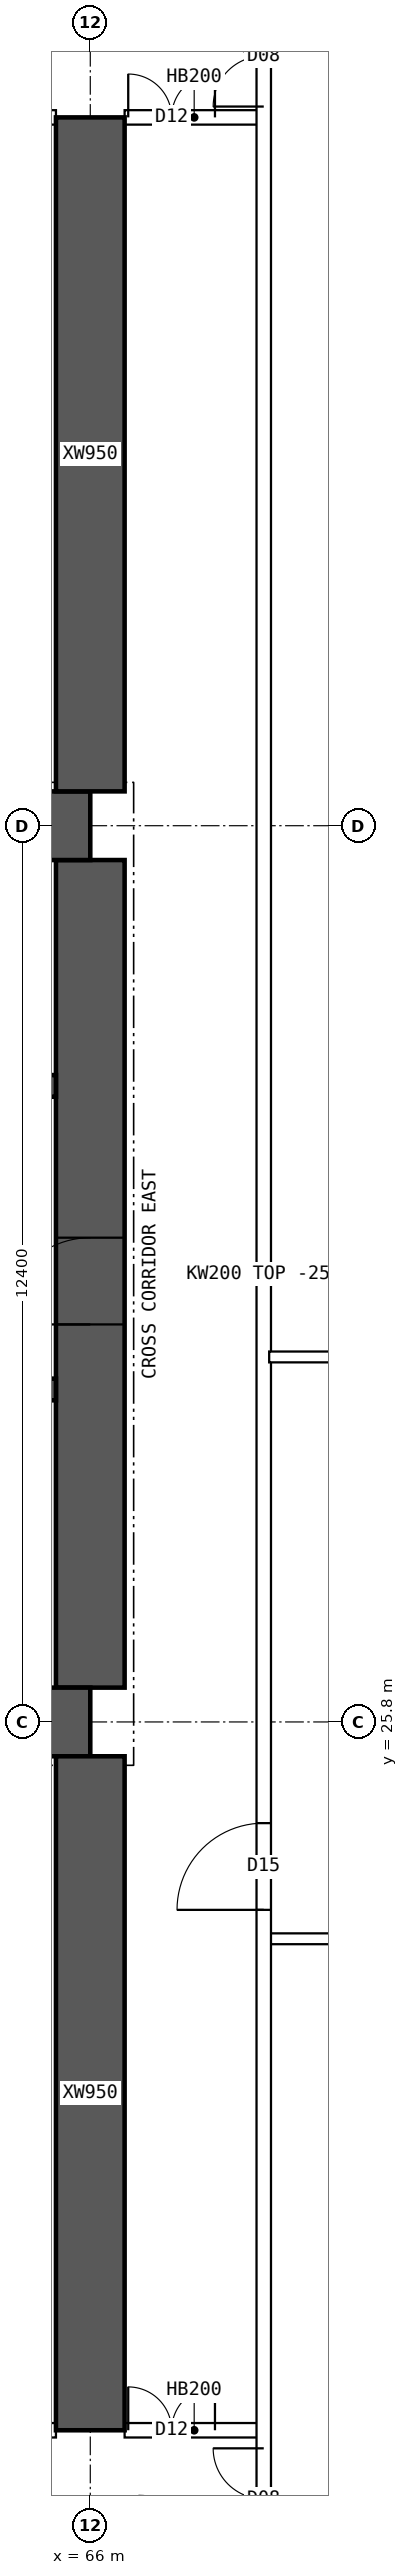
"""IFC4 building model, lengths in metres.
Left out: names, types, materials, properties, quantities, classifications, styles, units other than length and angle.
Written with IfcOpenShell. Run it as: python <this file> out.ifc"""

import sys

from ifc_helpers import new_model, si_unit, direction, frame, frame_2d, origin, place, context, subcontext, project, spatial, polyline, rectangle, outline, extrude, element, fill, save


model = new_model("IFC4")
c1 = context("Model", 3, precision=1e-05, world=origin(), true_north=direction((0.0, 1.0)))
c2 = subcontext(c1, "Body", "Model", "MODEL_VIEW")
j1 = project(units=[si_unit("LENGTHUNIT", "METRE"), si_unit("PLANEANGLEUNIT", "RADIAN")], contexts=[c1])
p1 = place(None, origin())
s1 = spatial("IfcSite", under=j1, at=p1, CompositionType="ELEMENT")
p2 = place(p1, origin())
s2 = spatial("IfcBuilding", under=s1, at=p2, CompositionType="ELEMENT")
p3 = place(p2, frame((0.0, 0.0, 114.4)))
s3 = spatial("IfcBuildingStorey", under=s2, at=p3, CompositionType="ELEMENT", Elevation=114.4)
for number, where, z_axis, x_axis in (
    (1, (18.0, 25.8, 0.0), (0.0, 0.0, 1.0), (1.0, 0.0, 0.0)),
    (2, (18.0, 38.2, 0.0), (0.0, 0.0, 1.0), (1.0, 0.0, 0.0)),
):
    element("IfcWall", number, at=place(p3, frame(where, z_axis=z_axis, x_axis=x_axis)), inside=s3, PredefinedType="SHEAR", context=c2, shape_type="SweptSolid", body=[
        extrude(rectangle(XDim=48.0, YDim=0.95, at=frame_2d((24.0, 0.0))), origin(), (0.0, 0.0, 1.0), 3.75),
    ])
p4 = place(p3, frame((66.0, 26.275, 0.0), z_axis=(0.0, 0.0, 1.0), x_axis=(0.0, 1.0, 0.0)))
e3 = element("IfcWall", 3, at=p4, inside=s3, PredefinedType="SHEAR", context=c2, shape_type="SweptSolid", body=[
    extrude(rectangle(XDim=11.45, YDim=0.95, at=frame_2d((5.725, 0.0))), origin(), (0.0, 0.0, 1.0), 3.75),
])
p5 = place(p4, frame((5.025, 0.0, 0.0)))
e4 = element("IfcOpeningElement", 4, at=p5, cuts=e3, PredefinedType="OPENING", context=c2, shape_type="SweptSolid", body=[
    extrude(rectangle(XDim=1.2, YDim=2.1, at=frame_2d((0.6, 1.05))), frame((0.0, 0.485, 0.0), z_axis=(0.0, -1.0, 0.0), x_axis=(1.0, 0.0, 0.0)), (0.0, 0.0, 1.0), 0.97),
])
p6 = place(p3, frame((18.475, 30.4, 0.0), z_axis=(0.0, 0.0, 1.0), x_axis=(1.0, 0.0, 0.0)))
e5 = element("IfcWall", 5, at=p6, inside=s3, PredefinedType="SHEAR", context=c2, shape_type="SweptSolid", body=[
    extrude(rectangle(XDim=47.05, YDim=0.3, at=frame_2d((23.525, 0.0))), origin(), (0.0, 0.0, 1.0), 3.75),
])
p7 = place(p6, frame((0.4, 0.0, 0.0)))
e6 = element("IfcOpeningElement", 6, at=p7, cuts=e5, PredefinedType="OPENING", context=c2, shape_type="SweptSolid", body=[
    extrude(rectangle(XDim=1.0, YDim=2.1, at=frame_2d((0.5, 1.05))), frame((0.0, 0.16, 0.0), z_axis=(0.0, -1.0, 0.0), x_axis=(1.0, 0.0, 0.0)), (0.0, 0.0, 1.0), 0.32),
])
p8 = place(p6, frame((45.65, 0.0, 0.0)))
e7 = element("IfcOpeningElement", 7, at=p8, cuts=e5, PredefinedType="OPENING", context=c2, shape_type="SweptSolid", body=[
    extrude(rectangle(XDim=1.0, YDim=2.1, at=frame_2d((0.5, 1.05))), frame((0.0, 0.16, 0.0), z_axis=(0.0, -1.0, 0.0), x_axis=(1.0, 0.0, 0.0)), (0.0, 0.0, 1.0), 0.32),
])
p9 = place(p6, frame((8.275, 0.0, 0.0)))
e8 = element("IfcOpeningElement", 8, at=p9, cuts=e5, PredefinedType="OPENING", context=c2, shape_type="SweptSolid", body=[
    extrude(rectangle(XDim=1.1, YDim=2.1, at=frame_2d((0.55, 1.05))), frame((0.0, 0.16, 0.0), z_axis=(0.0, -1.0, 0.0), x_axis=(1.0, 0.0, 0.0)), (0.0, 0.0, 1.0), 0.32),
])
p10 = place(p6, frame((10.875, 0.0, 0.0)))
e9 = element("IfcOpeningElement", 9, at=p10, cuts=e5, PredefinedType="OPENING", context=c2, shape_type="SweptSolid", body=[
    extrude(rectangle(XDim=1.1, YDim=2.1, at=frame_2d((0.55, 1.05))), frame((0.0, 0.16, 0.0), z_axis=(0.0, -1.0, 0.0), x_axis=(1.0, 0.0, 0.0)), (0.0, 0.0, 1.0), 0.32),
])
p11 = place(p6, frame((13.475, 0.0, 0.0)))
e10 = element("IfcOpeningElement", 10, at=p11, cuts=e5, PredefinedType="OPENING", context=c2, shape_type="SweptSolid", body=[
    extrude(rectangle(XDim=1.1, YDim=2.1, at=frame_2d((0.55, 1.05))), frame((0.0, 0.16, 0.0), z_axis=(0.0, -1.0, 0.0), x_axis=(1.0, 0.0, 0.0)), (0.0, 0.0, 1.0), 0.32),
])
p12 = place(p6, frame((16.075, 0.0, 0.0)))
e11 = element("IfcOpeningElement", 11, at=p12, cuts=e5, PredefinedType="OPENING", context=c2, shape_type="SweptSolid", body=[
    extrude(rectangle(XDim=1.1, YDim=2.1, at=frame_2d((0.55, 1.05))), frame((0.0, 0.16, 0.0), z_axis=(0.0, -1.0, 0.0), x_axis=(1.0, 0.0, 0.0)), (0.0, 0.0, 1.0), 0.32),
])
p13 = place(p6, frame((18.85, 0.0, 0.0)))
e12 = element("IfcOpeningElement", 12, at=p13, cuts=e5, PredefinedType="OPENING", context=c2, shape_type="SweptSolid", body=[
    extrude(rectangle(XDim=0.9, YDim=2.1, at=frame_2d((0.45, 1.05))), frame((0.0, 0.16, 0.0), z_axis=(0.0, -1.0, 0.0), x_axis=(1.0, 0.0, 0.0)), (0.0, 0.0, 1.0), 0.32),
])
p14 = place(p6, frame((30.142, 0.0, 0.0)))
e13 = element("IfcOpeningElement", 13, at=p14, cuts=e5, PredefinedType="OPENING", context=c2, shape_type="SweptSolid", body=[
    extrude(rectangle(XDim=1.1, YDim=2.1, at=frame_2d((0.55, 1.05))), frame((0.0, 0.16, 0.0), z_axis=(0.0, -1.0, 0.0), x_axis=(1.0, 0.0, 0.0)), (0.0, 0.0, 1.0), 0.32),
])
p15 = place(p6, frame((33.675, 0.0, 0.0)))
e14 = element("IfcOpeningElement", 14, at=p15, cuts=e5, PredefinedType="OPENING", context=c2, shape_type="SweptSolid", body=[
    extrude(rectangle(XDim=1.1, YDim=2.1, at=frame_2d((0.55, 1.05))), frame((0.0, 0.16, 0.0), z_axis=(0.0, -1.0, 0.0), x_axis=(1.0, 0.0, 0.0)), (0.0, 0.0, 1.0), 0.32),
])
p16 = place(p6, frame((37.208, 0.0, 0.0)))
e15 = element("IfcOpeningElement", 15, at=p16, cuts=e5, PredefinedType="OPENING", context=c2, shape_type="SweptSolid", body=[
    extrude(rectangle(XDim=1.1, YDim=2.1, at=frame_2d((0.55, 1.05))), frame((0.0, 0.16, 0.0), z_axis=(0.0, -1.0, 0.0), x_axis=(1.0, 0.0, 0.0)), (0.0, 0.0, 1.0), 0.32),
])
p17 = place(p3, frame((18.475, 34.6, 0.0), z_axis=(0.0, 0.0, 1.0), x_axis=(1.0, 0.0, 0.0)))
e16 = element("IfcWall", 16, at=p17, inside=s3, PredefinedType="SHEAR", context=c2, shape_type="SweptSolid", body=[
    extrude(rectangle(XDim=47.05, YDim=0.3, at=frame_2d((23.525, 0.0))), origin(), (0.0, 0.0, 1.0), 3.75),
])
p18 = place(p17, frame((0.9, 0.0, 0.0)))
e17 = element("IfcOpeningElement", 17, at=p18, cuts=e16, PredefinedType="OPENING", context=c2, shape_type="SweptSolid", body=[
    extrude(rectangle(XDim=1.1, YDim=2.1, at=frame_2d((0.55, 1.05))), frame((0.0, 0.16, 0.0), z_axis=(0.0, -1.0, 0.0), x_axis=(1.0, 0.0, 0.0)), (0.0, 0.0, 1.0), 0.32),
])
p19 = place(p17, frame((45.05, 0.0, 0.0)))
e18 = element("IfcOpeningElement", 18, at=p19, cuts=e16, PredefinedType="OPENING", context=c2, shape_type="SweptSolid", body=[
    extrude(rectangle(XDim=1.1, YDim=2.1, at=frame_2d((0.55, 1.05))), frame((0.0, 0.16, 0.0), z_axis=(0.0, -1.0, 0.0), x_axis=(1.0, 0.0, 0.0)), (0.0, 0.0, 1.0), 0.32),
])
p20 = place(p17, frame((4.125, 0.0, 0.0)))
e19 = element("IfcOpeningElement", 19, at=p20, cuts=e16, PredefinedType="OPENING", context=c2, shape_type="SweptSolid", body=[
    extrude(rectangle(XDim=0.9, YDim=2.1, at=frame_2d((0.45, 1.05))), frame((0.0, 0.16, 0.0), z_axis=(0.0, -1.0, 0.0), x_axis=(1.0, 0.0, 0.0)), (0.0, 0.0, 1.0), 0.32),
])
p21 = place(p17, frame((42.025, 0.0, 0.0)))
e20 = element("IfcOpeningElement", 20, at=p21, cuts=e16, PredefinedType="OPENING", context=c2, shape_type="SweptSolid", body=[
    extrude(rectangle(XDim=0.9, YDim=2.1, at=frame_2d((0.45, 1.05))), frame((0.0, 0.16, 0.0), z_axis=(0.0, -1.0, 0.0), x_axis=(1.0, 0.0, 0.0)), (0.0, 0.0, 1.0), 0.32),
])
p22 = place(p17, frame((8.9, 0.0, 0.0)))
e21 = element("IfcOpeningElement", 21, at=p22, cuts=e16, PredefinedType="OPENING", context=c2, shape_type="SweptSolid", body=[
    extrude(rectangle(XDim=0.9, YDim=2.1, at=frame_2d((0.45, 1.05))), frame((0.0, 0.16, 0.0), z_axis=(0.0, -1.0, 0.0), x_axis=(1.0, 0.0, 0.0)), (0.0, 0.0, 1.0), 0.32),
])
p23 = place(p17, frame((12.874, 0.0, 0.0)))
e22 = element("IfcOpeningElement", 22, at=p23, cuts=e16, PredefinedType="OPENING", context=c2, shape_type="SweptSolid", body=[
    extrude(rectangle(XDim=0.9, YDim=2.1, at=frame_2d((0.45, 1.05))), frame((0.0, 0.16, 0.0), z_axis=(0.0, -1.0, 0.0), x_axis=(1.0, 0.0, 0.0)), (0.0, 0.0, 1.0), 0.32),
])
p24 = place(p17, frame((16.521, 0.0, 0.0)))
e23 = element("IfcOpeningElement", 23, at=p24, cuts=e16, PredefinedType="OPENING", context=c2, shape_type="SweptSolid", body=[
    extrude(rectangle(XDim=0.9, YDim=2.1, at=frame_2d((0.45, 1.05))), frame((0.0, 0.16, 0.0), z_axis=(0.0, -1.0, 0.0), x_axis=(1.0, 0.0, 0.0)), (0.0, 0.0, 1.0), 0.32),
])
p25 = place(p17, frame((20.28, 0.0, 0.0)))
e24 = element("IfcOpeningElement", 24, at=p25, cuts=e16, PredefinedType="OPENING", context=c2, shape_type="SweptSolid", body=[
    extrude(rectangle(XDim=0.9, YDim=2.1, at=frame_2d((0.45, 1.05))), frame((0.0, 0.16, 0.0), z_axis=(0.0, -1.0, 0.0), x_axis=(1.0, 0.0, 0.0)), (0.0, 0.0, 1.0), 0.32),
])
p26 = place(p17, frame((24.686, 0.0, 0.0)))
e25 = element("IfcOpeningElement", 25, at=p26, cuts=e16, PredefinedType="OPENING", context=c2, shape_type="SweptSolid", body=[
    extrude(rectangle(XDim=0.9, YDim=2.1, at=frame_2d((0.45, 1.05))), frame((0.0, 0.16, 0.0), z_axis=(0.0, -1.0, 0.0), x_axis=(1.0, 0.0, 0.0)), (0.0, 0.0, 1.0), 0.32),
])
p27 = place(p17, frame((27.483, 0.0, 0.0)))
e26 = element("IfcOpeningElement", 26, at=p27, cuts=e16, PredefinedType="OPENING", context=c2, shape_type="SweptSolid", body=[
    extrude(rectangle(XDim=0.9, YDim=2.1, at=frame_2d((0.45, 1.05))), frame((0.0, 0.16, 0.0), z_axis=(0.0, -1.0, 0.0), x_axis=(1.0, 0.0, 0.0)), (0.0, 0.0, 1.0), 0.32),
])
p28 = place(p17, frame((29.856, 0.0, 0.0)))
e27 = element("IfcOpeningElement", 27, at=p28, cuts=e16, PredefinedType="OPENING", context=c2, shape_type="SweptSolid", body=[
    extrude(rectangle(XDim=0.9, YDim=2.1, at=frame_2d((0.45, 1.05))), frame((0.0, 0.16, 0.0), z_axis=(0.0, -1.0, 0.0), x_axis=(1.0, 0.0, 0.0)), (0.0, 0.0, 1.0), 0.32),
])
p29 = place(p17, frame((33.706, 0.0, 0.0)))
e28 = element("IfcOpeningElement", 28, at=p29, cuts=e16, PredefinedType="OPENING", context=c2, shape_type="SweptSolid", body=[
    extrude(rectangle(XDim=0.9, YDim=2.1, at=frame_2d((0.45, 1.05))), frame((0.0, 0.16, 0.0), z_axis=(0.0, -1.0, 0.0), x_axis=(1.0, 0.0, 0.0)), (0.0, 0.0, 1.0), 0.32),
])
p30 = place(p17, frame((37.454, 0.0, 0.0)))
e29 = element("IfcOpeningElement", 29, at=p30, cuts=e16, PredefinedType="OPENING", context=c2, shape_type="SweptSolid", body=[
    extrude(rectangle(XDim=0.9, YDim=2.1, at=frame_2d((0.45, 1.05))), frame((0.0, 0.16, 0.0), z_axis=(0.0, -1.0, 0.0), x_axis=(1.0, 0.0, 0.0)), (0.0, 0.0, 1.0), 0.32),
])
for number, where, z_axis, x_axis in (
    (30, (66.0, 16.0, 0.0), (0.0, 0.0, 1.0), (0.0, 1.0, 0.0)),
    (31, (66.0, 38.675, 0.0), (0.0, 0.0, 1.0), (0.0, 1.0, 0.0)),
):
    element("IfcWall", number, at=place(p3, frame(where, z_axis=z_axis, x_axis=x_axis)), inside=s3, PredefinedType="SHEAR", context=c2, shape_type="SweptSolid", body=[
        extrude(rectangle(XDim=9.325, YDim=0.95, at=frame_2d((4.663, 0.0))), origin(), (0.0, 0.0, 1.0), 3.75),
    ])
p31 = place(p3, frame((60.475, 16.0, 0.0), z_axis=(0.0, 0.0, 1.0), x_axis=(1.0, 0.0, 0.0)))
e32 = element("IfcWall", 32, at=p31, inside=s3, PredefinedType="SOLIDWALL", context=c2, shape_type="SweptSolid", body=[
    extrude(rectangle(XDim=5.05, YDim=0.2, at=frame_2d((2.525, 0.0))), origin(), (0.0, 0.0, 1.0), 3.5),
])
p32 = place(p31, frame((0.15, 0.0, 0.0)))
e33 = element("IfcOpeningElement", 33, at=p32, cuts=e32, PredefinedType="OPENING", context=c2, shape_type="SweptSolid", body=[
    extrude(rectangle(XDim=0.9, YDim=2.1, at=frame_2d((0.45, 1.05))), frame((0.0, 0.11, 0.0), z_axis=(0.0, -1.0, 0.0), x_axis=(1.0, 0.0, 0.0)), (0.0, 0.0, 1.0), 0.22),
])
p33 = place(p31, frame((3.235, 0.0, 0.0)))
e34 = element("IfcOpeningElement", 34, at=p33, cuts=e32, PredefinedType="OPENING", context=c2, shape_type="SweptSolid", body=[
    extrude(rectangle(XDim=0.9, YDim=2.1, at=frame_2d((0.45, 1.05))), frame((0.0, 0.11, 0.0), z_axis=(0.0, -1.0, 0.0), x_axis=(1.0, 0.0, 0.0)), (0.0, 0.0, 1.0), 0.22),
])
p34 = place(p3, frame((66.475, 16.0, 0.0), z_axis=(0.0, 0.0, 1.0), x_axis=(1.0, 0.0, 0.0)))
e35 = element("IfcWall", 35, at=p34, inside=s3, PredefinedType="SOLIDWALL", context=c2, shape_type="SweptSolid", body=[
    extrude(rectangle(XDim=1.925, YDim=0.2, at=frame_2d((0.962, 0.0))), origin(), (0.0, 0.0, 1.0), 3.5),
])
p35 = place(p34, frame((0.05, 0.0, 0.0)))
e36 = element("IfcOpeningElement", 36, at=p35, cuts=e35, PredefinedType="OPENING", context=c2, shape_type="SweptSolid", body=[
    extrude(rectangle(XDim=1.2, YDim=2.1, at=frame_2d((0.6, 1.05))), frame((0.0, 0.11, 0.0), z_axis=(0.0, -1.0, 0.0), x_axis=(1.0, 0.0, 0.0)), (0.0, 0.0, 1.0), 0.22),
])
p36 = place(p3, frame((60.475, 48.0, 0.0), z_axis=(0.0, 0.0, 1.0), x_axis=(1.0, 0.0, 0.0)))
e37 = element("IfcWall", 37, at=p36, inside=s3, PredefinedType="SOLIDWALL", context=c2, shape_type="SweptSolid", body=[
    extrude(rectangle(XDim=5.05, YDim=0.2, at=frame_2d((2.525, 0.0))), origin(), (0.0, 0.0, 1.0), 3.5),
])
p37 = place(p36, frame((0.15, 0.0, 0.0)))
e38 = element("IfcOpeningElement", 38, at=p37, cuts=e37, PredefinedType="OPENING", context=c2, shape_type="SweptSolid", body=[
    extrude(rectangle(XDim=0.9, YDim=2.1, at=frame_2d((0.45, 1.05))), frame((0.0, 0.11, 0.0), z_axis=(0.0, -1.0, 0.0), x_axis=(1.0, 0.0, 0.0)), (0.0, 0.0, 1.0), 0.22),
])
p38 = place(p36, frame((3.285, 0.0, 0.0)))
e39 = element("IfcOpeningElement", 39, at=p38, cuts=e37, PredefinedType="OPENING", context=c2, shape_type="SweptSolid", body=[
    extrude(rectangle(XDim=0.9, YDim=2.1, at=frame_2d((0.45, 1.05))), frame((0.0, 0.11, 0.0), z_axis=(0.0, -1.0, 0.0), x_axis=(1.0, 0.0, 0.0)), (0.0, 0.0, 1.0), 0.22),
])
p39 = place(p3, frame((66.475, 48.0, 0.0), z_axis=(0.0, 0.0, 1.0), x_axis=(1.0, 0.0, 0.0)))
e40 = element("IfcWall", 40, at=p39, inside=s3, PredefinedType="SOLIDWALL", context=c2, shape_type="SweptSolid", body=[
    extrude(rectangle(XDim=1.925, YDim=0.2, at=frame_2d((0.962, 0.0))), origin(), (0.0, 0.0, 1.0), 3.5),
])
p40 = place(p39, frame((0.05, 0.0, 0.0)))
e41 = element("IfcOpeningElement", 41, at=p40, cuts=e40, PredefinedType="OPENING", context=c2, shape_type="SweptSolid", body=[
    extrude(rectangle(XDim=1.2, YDim=2.1, at=frame_2d((0.6, 1.05))), frame((0.0, 0.11, 0.0), z_axis=(0.0, -1.0, 0.0), x_axis=(1.0, 0.0, 0.0)), (0.0, 0.0, 1.0), 0.22),
])
p41 = place(p3, frame((68.475, 30.85, 0.0), z_axis=(0.0, 0.0, 1.0), x_axis=(1.0, 0.0, 0.0)))
e42 = element("IfcWall", 42, at=p41, inside=s3, PredefinedType="PARTITIONING", context=c2, shape_type="SweptSolid", body=[
    extrude(outline(polyline([(0.0, 0.0), (6.82, 0.0), (6.82, 3.5), (3.827, 3.5), (3.825, 3.05), (3.227, 3.05), (3.225, 3.5), (0.0, 3.5), (0.0, 0.0)])), frame((0.0, 0.075, 0.0), z_axis=(0.0, -1.0, 0.0), x_axis=(1.0, 0.0, 0.0)), (0.0, 0.0, 1.0), 0.15),
])
p42 = place(p3, frame((68.4, 9.405, 0.0), z_axis=(0.0, 0.0, 1.0), x_axis=(0.0, 1.0, 0.0)))
e43 = element("IfcWall", 43, at=p42, inside=s3, PredefinedType="SOLIDWALL", context=c2, shape_type="SweptSolid", body=[
    extrude(rectangle(XDim=45.189, YDim=0.2, at=frame_2d((22.595, 0.0))), origin(), (0.0, 0.0, 1.0), 3.5),
])
p43 = place(p42, frame((13.795, 0.0, 0.0)))
e44 = element("IfcOpeningElement", 44, at=p43, cuts=e43, PredefinedType="OPENING", context=c2, shape_type="SweptSolid", body=[
    extrude(rectangle(XDim=1.2, YDim=2.1, at=frame_2d((0.6, 1.05))), frame((0.0, 0.11, 0.0), z_axis=(0.0, -1.0, 0.0), x_axis=(1.0, 0.0, 0.0)), (0.0, 0.0, 1.0), 0.22),
])
p44 = place(p42, frame((4.945, 0.0, 0.0)))
e45 = element("IfcOpeningElement", 45, at=p44, cuts=e43, PredefinedType="OPENING", context=c2, shape_type="SweptSolid", body=[
    extrude(rectangle(XDim=1.4, YDim=2.1, at=frame_2d((0.7, 1.05))), frame((0.0, 0.11, 0.0), z_axis=(0.0, -1.0, 0.0), x_axis=(1.0, 0.0, 0.0)), (0.0, 0.0, 1.0), 0.22),
])
p45 = place(p42, frame((38.745, 0.0, 0.0)))
e46 = element("IfcOpeningElement", 46, at=p45, cuts=e43, PredefinedType="OPENING", context=c2, shape_type="SweptSolid", body=[
    extrude(rectangle(XDim=1.4, YDim=2.1, at=frame_2d((0.7, 1.05))), frame((0.0, 0.11, 0.0), z_axis=(0.0, -1.0, 0.0), x_axis=(1.0, 0.0, 0.0)), (0.0, 0.0, 1.0), 0.22),
])
p46 = place(p3, frame((68.475, 22.8, 0.0), z_axis=(0.0, 0.0, 1.0), x_axis=(1.0, 0.0, 0.0)))
e47 = element("IfcWall", 47, at=p46, inside=s3, PredefinedType="PARTITIONING", context=c2, shape_type="SweptSolid", body=[
    extrude(outline(polyline([(0.0, 0.0), (6.82, 0.0), (6.82, 3.5), (3.827, 3.5), (3.825, 3.05), (3.227, 3.05), (3.225, 3.5), (0.0, 3.5), (0.0, 0.0)])), frame((0.0, 0.075, 0.0), z_axis=(0.0, -1.0, 0.0), x_axis=(1.0, 0.0, 0.0)), (0.0, 0.0, 1.0), 0.15),
])
p47 = place(p5, origin())
e48 = element("IfcDoor", 48, at=p47, inside=s3, OperationType="SINGLE_SWING_LEFT", PredefinedType="DOOR", context=c2, shape_type="SweptSolid", body=[
    extrude(rectangle(XDim=1.2, YDim=2.1, at=frame_2d((0.6, 1.05))), frame((0.0, 0.025, 0.0), z_axis=(0.0, -1.0, 0.0), x_axis=(1.0, 0.0, 0.0)), (0.0, 0.0, 1.0), 0.05),
])
fill(e4, e48)
p48 = place(p35, origin())
e49 = element("IfcDoor", 49, at=p48, inside=s3, OperationType="DOUBLE_DOOR_SINGLE_SWING", PredefinedType="DOOR", context=c2, shape_type="SweptSolid", body=[
    extrude(rectangle(XDim=1.2, YDim=2.1, at=frame_2d((0.6, 1.05))), frame((0.0, 0.025, 0.0), z_axis=(0.0, -1.0, 0.0), x_axis=(1.0, 0.0, 0.0)), (0.0, 0.0, 1.0), 0.05),
])
fill(e36, e49)
p49 = place(p40, origin())
e50 = element("IfcDoor", 50, at=p49, inside=s3, OperationType="DOUBLE_DOOR_SINGLE_SWING", PredefinedType="DOOR", context=c2, shape_type="SweptSolid", body=[
    extrude(rectangle(XDim=1.2, YDim=2.1, at=frame_2d((0.6, 1.05))), frame((0.0, 0.025, 0.0), z_axis=(0.0, -1.0, 0.0), x_axis=(1.0, 0.0, 0.0)), (0.0, 0.0, 1.0), 0.05),
])
fill(e41, e50)
p50 = place(p43, origin())
e51 = element("IfcDoor", 51, at=p50, inside=s3, OperationType="SINGLE_SWING_LEFT", PredefinedType="DOOR", context=c2, shape_type="SweptSolid", body=[
    extrude(rectangle(XDim=1.2, YDim=2.1, at=frame_2d((0.6, 1.05))), frame((0.0, 0.025, 0.0), z_axis=(0.0, -1.0, 0.0), x_axis=(1.0, 0.0, 0.0)), (0.0, 0.0, 1.0), 0.05),
])
fill(e44, e51)
p51 = place(p44, origin())
e52 = element("IfcDoor", 52, at=p51, inside=s3, OperationType="DOUBLE_DOOR_SINGLE_SWING", PredefinedType="DOOR", context=c2, shape_type="SweptSolid", body=[
    extrude(rectangle(XDim=1.4, YDim=2.1, at=frame_2d((0.7, 1.05))), frame((0.0, 0.025, 0.0), z_axis=(0.0, -1.0, 0.0), x_axis=(1.0, 0.0, 0.0)), (0.0, 0.0, 1.0), 0.05),
])
fill(e45, e52)
p52 = place(p45, origin())
e53 = element("IfcDoor", 53, at=p52, inside=s3, OperationType="DOUBLE_DOOR_SINGLE_SWING", PredefinedType="DOOR", context=c2, shape_type="SweptSolid", body=[
    extrude(rectangle(XDim=1.4, YDim=2.1, at=frame_2d((0.7, 1.05))), frame((0.0, 0.025, 0.0), z_axis=(0.0, -1.0, 0.0), x_axis=(1.0, 0.0, 0.0)), (0.0, 0.0, 1.0), 0.05),
])
fill(e46, e53)
save(model, sys.argv[1])
